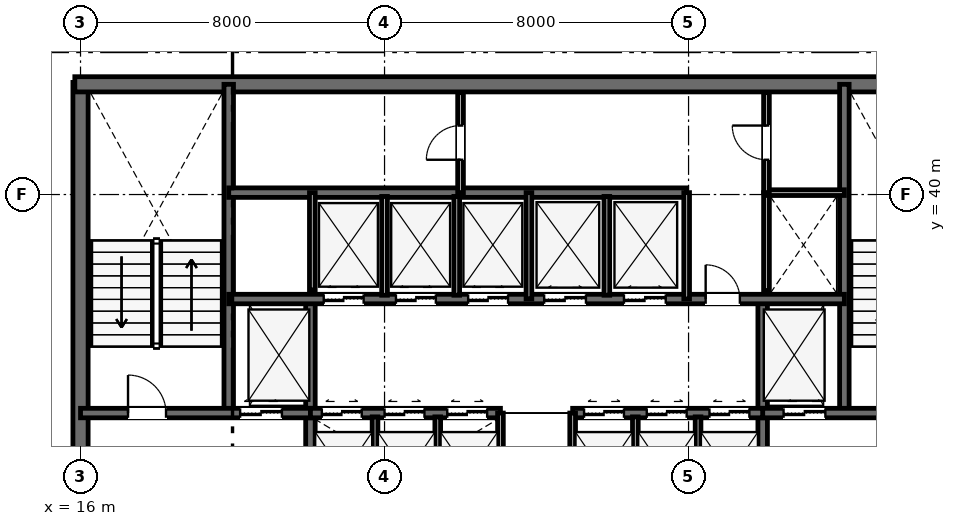
"""IFC4 building model, lengths in metres.
Left out: names, types, materials, properties, quantities, classifications, styles, units other than length and angle.
Written with IfcOpenShell. Run it as: python <this file> out.ifc"""

import sys

from ifc_helpers import new_model, si_unit, direction, frame, frame_2d, origin, place, context, subcontext, project, spatial, rectangle, extrude, element, fill, save


model = new_model("IFC4")
c1 = context("Model", 3, precision=1e-05, world=origin(), true_north=direction((0.0, 1.0)))
c2 = subcontext(c1, "Body", "Model", "MODEL_VIEW")
j1 = project(units=[si_unit("LENGTHUNIT", "METRE"), si_unit("PLANEANGLEUNIT", "RADIAN")], contexts=[c1])
p1 = place(None, origin())
s1 = spatial("IfcSite", under=j1, at=p1, CompositionType="ELEMENT")
p2 = place(p1, origin())
s2 = spatial("IfcBuilding", under=s1, at=p2, CompositionType="ELEMENT")
p3 = place(p2, origin())
s3 = spatial("IfcBuildingStorey", under=s2, at=p3, CompositionType="ELEMENT", Elevation=0.0)
p4 = place(p3, frame((16.0, 30.65, 0.0), z_axis=(0.0, 0.0, 1.0), x_axis=(0.0, 1.0, 0.0)))
e1 = element("IfcWall", 1, at=p4, inside=s3, PredefinedType="SHEAR", context=c2, shape_type="SweptSolid", body=[
    extrude(rectangle(XDim=12.3, YDim=0.4, at=frame_2d((6.15, 0.0))), origin(), (0.0, 0.0, 1.0), 6.0),
])
p5 = place(p3, frame((15.85, 42.9, 0.0), z_axis=(0.0, 0.0, 1.0), x_axis=(1.0, 0.0, 0.0)))
e2 = element("IfcWall", 2, at=p5, inside=s3, PredefinedType="SHEAR", context=c2, shape_type="SweptSolid", body=[
    extrude(rectangle(XDim=24.3, YDim=0.4, at=frame_2d((12.15, 0.0))), origin(), (0.0, 0.0, 1.0), 6.0),
])
for number, where, z_axis, x_axis in (
    (3, (19.9, 34.25, 0.0), (0.0, 0.0, 1.0), (0.0, 1.0, 0.0)),
    (4, (36.1, 34.25, 0.0), (0.0, 0.0, 1.0), (0.0, 1.0, 0.0)),
):
    element("IfcWall", number, at=place(p3, frame(where, z_axis=z_axis, x_axis=x_axis)), inside=s3, PredefinedType="SHEAR", context=c2, shape_type="SweptSolid", body=[
        extrude(rectangle(XDim=8.65, YDim=0.25, at=frame_2d((4.325, 0.0))), origin(), (0.0, 0.0, 1.0), 6.0),
    ])
for number, where, z_axis, x_axis in (
    (5, (22.05, 30.8, 0.0), (0.0, 0.0, 1.0), (0.0, 1.0, 0.0)),
    (6, (33.95, 30.8, 0.0), (0.0, 0.0, 1.0), (0.0, 1.0, 0.0)),
):
    element("IfcWall", number, at=place(p3, frame(where, z_axis=z_axis, x_axis=x_axis)), inside=s3, PredefinedType="SHEAR", context=c2, shape_type="SweptSolid", body=[
        extrude(rectangle(XDim=6.45, YDim=0.25, at=frame_2d((3.225, 0.0))), origin(), (0.0, 0.0, 1.0), 6.0),
    ])
p6 = place(p3, frame((16.0, 34.25, 0.0), z_axis=(0.0, 0.0, 1.0), x_axis=(1.0, 0.0, 0.0)))
e7 = element("IfcWall", 7, at=p6, inside=s3, PredefinedType="SHEAR", context=c2, shape_type="SweptSolid", body=[
    extrude(rectangle(XDim=6.05, YDim=0.25, at=frame_2d((3.025, 0.0))), origin(), (0.0, 0.0, 1.0), 6.0),
])
p7 = place(p6, frame((1.25, 0.0, 0.0)))
e8 = element("IfcOpeningElement", 8, at=p7, cuts=e7, PredefinedType="OPENING", context=c2, shape_type="SweptSolid", body=[
    extrude(rectangle(XDim=1.0, YDim=2.15, at=frame_2d((0.5, 1.075))), frame((0.0, 0.135, 0.0), z_axis=(0.0, -1.0, 0.0), x_axis=(1.0, 0.0, 0.0)), (0.0, 0.0, 1.0), 0.27),
])
p8 = place(p6, frame((4.2, 0.0, 0.0)))
e9 = element("IfcOpeningElement", 9, at=p8, cuts=e7, PredefinedType="OPENING", context=c2, shape_type="SweptSolid", body=[
    extrude(rectangle(XDim=1.1, YDim=2.15, at=frame_2d((0.55, 1.075))), frame((0.0, 0.135, 0.0), z_axis=(0.0, -1.0, 0.0), x_axis=(1.0, 0.0, 0.0)), (0.0, 0.0, 1.0), 0.27),
])
p9 = place(p3, frame((33.95, 34.25, 0.0), z_axis=(0.0, 0.0, 1.0), x_axis=(1.0, 0.0, 0.0)))
e10 = element("IfcWall", 10, at=p9, inside=s3, PredefinedType="SHEAR", context=c2, shape_type="SweptSolid", body=[
    extrude(rectangle(XDim=6.05, YDim=0.25, at=frame_2d((3.025, 0.0))), origin(), (0.0, 0.0, 1.0), 6.0),
])
p10 = place(p9, frame((3.7, 0.0, 0.0)))
e11 = element("IfcOpeningElement", 11, at=p10, cuts=e10, PredefinedType="OPENING", context=c2, shape_type="SweptSolid", body=[
    extrude(rectangle(XDim=1.0, YDim=2.15, at=frame_2d((0.5, 1.075))), frame((0.0, 0.135, 0.0), z_axis=(0.0, -1.0, 0.0), x_axis=(1.0, 0.0, 0.0)), (0.0, 0.0, 1.0), 0.27),
])
p11 = place(p9, frame((0.55, 0.0, 0.0)))
e12 = element("IfcOpeningElement", 12, at=p11, cuts=e10, PredefinedType="OPENING", context=c2, shape_type="SweptSolid", body=[
    extrude(rectangle(XDim=1.1, YDim=2.15, at=frame_2d((0.55, 1.075))), frame((0.0, 0.135, 0.0), z_axis=(0.0, -1.0, 0.0), x_axis=(1.0, 0.0, 0.0)), (0.0, 0.0, 1.0), 0.27),
])
p12 = place(p3, frame((22.05, 34.25, 0.0), z_axis=(0.0, 0.0, 1.0), x_axis=(1.0, 0.0, 0.0)))
e13 = element("IfcWall", 13, at=p12, inside=s3, PredefinedType="SHEAR", context=c2, shape_type="SweptSolid", body=[
    extrude(rectangle(XDim=5.0, YDim=0.25, at=frame_2d((2.5, 0.0))), origin(), (0.0, 0.0, 1.0), 6.0),
])
p13 = place(p12, frame((0.3, 0.0, 0.0)))
e14 = element("IfcOpeningElement", 14, at=p13, cuts=e13, PredefinedType="OPENING", context=c2, shape_type="SweptSolid", body=[
    extrude(rectangle(XDim=1.05, YDim=2.15, at=frame_2d((0.525, 1.075))), frame((0.0, 0.135, 0.0), z_axis=(0.0, -1.0, 0.0), x_axis=(1.0, 0.0, 0.0)), (0.0, 0.0, 1.0), 0.27),
])
p14 = place(p12, frame((1.95, 0.0, 0.0)))
e15 = element("IfcOpeningElement", 15, at=p14, cuts=e13, PredefinedType="OPENING", context=c2, shape_type="SweptSolid", body=[
    extrude(rectangle(XDim=1.05, YDim=2.15, at=frame_2d((0.525, 1.075))), frame((0.0, 0.135, 0.0), z_axis=(0.0, -1.0, 0.0), x_axis=(1.0, 0.0, 0.0)), (0.0, 0.0, 1.0), 0.27),
])
p15 = place(p12, frame((3.6, 0.0, 0.0)))
e16 = element("IfcOpeningElement", 16, at=p15, cuts=e13, PredefinedType="OPENING", context=c2, shape_type="SweptSolid", body=[
    extrude(rectangle(XDim=1.05, YDim=2.15, at=frame_2d((0.525, 1.075))), frame((0.0, 0.135, 0.0), z_axis=(0.0, -1.0, 0.0), x_axis=(1.0, 0.0, 0.0)), (0.0, 0.0, 1.0), 0.27),
])
p16 = place(p3, frame((28.95, 34.25, 0.0), z_axis=(0.0, 0.0, 1.0), x_axis=(1.0, 0.0, 0.0)))
e17 = element("IfcWall", 17, at=p16, inside=s3, PredefinedType="SHEAR", context=c2, shape_type="SweptSolid", body=[
    extrude(rectangle(XDim=5.0, YDim=0.25, at=frame_2d((2.5, 0.0))), origin(), (0.0, 0.0, 1.0), 6.0),
])
p17 = place(p16, frame((0.3, 0.0, 0.0)))
e18 = element("IfcOpeningElement", 18, at=p17, cuts=e17, PredefinedType="OPENING", context=c2, shape_type="SweptSolid", body=[
    extrude(rectangle(XDim=1.05, YDim=2.15, at=frame_2d((0.525, 1.075))), frame((0.0, 0.135, 0.0), z_axis=(0.0, -1.0, 0.0), x_axis=(1.0, 0.0, 0.0)), (0.0, 0.0, 1.0), 0.27),
])
p18 = place(p16, frame((1.95, 0.0, 0.0)))
e19 = element("IfcOpeningElement", 19, at=p18, cuts=e17, PredefinedType="OPENING", context=c2, shape_type="SweptSolid", body=[
    extrude(rectangle(XDim=1.05, YDim=2.15, at=frame_2d((0.525, 1.075))), frame((0.0, 0.135, 0.0), z_axis=(0.0, -1.0, 0.0), x_axis=(1.0, 0.0, 0.0)), (0.0, 0.0, 1.0), 0.27),
])
p19 = place(p16, frame((3.6, 0.0, 0.0)))
e20 = element("IfcOpeningElement", 20, at=p19, cuts=e17, PredefinedType="OPENING", context=c2, shape_type="SweptSolid", body=[
    extrude(rectangle(XDim=1.05, YDim=2.15, at=frame_2d((0.525, 1.075))), frame((0.0, 0.135, 0.0), z_axis=(0.0, -1.0, 0.0), x_axis=(1.0, 0.0, 0.0)), (0.0, 0.0, 1.0), 0.27),
])
p20 = place(p3, frame((19.9, 37.25, 0.0), z_axis=(0.0, 0.0, 1.0), x_axis=(1.0, 0.0, 0.0)))
e21 = element("IfcWall", 21, at=p20, inside=s3, PredefinedType="SHEAR", context=c2, shape_type="SweptSolid", body=[
    extrude(rectangle(XDim=16.2, YDim=0.25, at=frame_2d((8.1, 0.0))), origin(), (0.0, 0.0, 1.0), 6.0),
])
p21 = place(p20, frame((12.55, 0.0, 0.0)))
e22 = element("IfcOpeningElement", 22, at=p21, cuts=e21, PredefinedType="OPENING", context=c2, shape_type="SweptSolid", body=[
    extrude(rectangle(XDim=0.9, YDim=2.15, at=frame_2d((0.45, 1.075))), frame((0.0, 0.135, 0.0), z_axis=(0.0, -1.0, 0.0), x_axis=(1.0, 0.0, 0.0)), (0.0, 0.0, 1.0), 0.27),
])
p22 = place(p20, frame((2.5, 0.0, 0.0)))
e23 = element("IfcOpeningElement", 23, at=p22, cuts=e21, PredefinedType="OPENING", context=c2, shape_type="SweptSolid", body=[
    extrude(rectangle(XDim=1.05, YDim=2.15, at=frame_2d((0.525, 1.075))), frame((0.0, 0.135, 0.0), z_axis=(0.0, -1.0, 0.0), x_axis=(1.0, 0.0, 0.0)), (0.0, 0.0, 1.0), 0.27),
])
p23 = place(p20, frame((4.4, 0.0, 0.0)))
e24 = element("IfcOpeningElement", 24, at=p23, cuts=e21, PredefinedType="OPENING", context=c2, shape_type="SweptSolid", body=[
    extrude(rectangle(XDim=1.05, YDim=2.15, at=frame_2d((0.525, 1.075))), frame((0.0, 0.135, 0.0), z_axis=(0.0, -1.0, 0.0), x_axis=(1.0, 0.0, 0.0)), (0.0, 0.0, 1.0), 0.27),
])
p24 = place(p20, frame((6.3, 0.0, 0.0)))
e25 = element("IfcOpeningElement", 25, at=p24, cuts=e21, PredefinedType="OPENING", context=c2, shape_type="SweptSolid", body=[
    extrude(rectangle(XDim=1.05, YDim=2.15, at=frame_2d((0.525, 1.075))), frame((0.0, 0.135, 0.0), z_axis=(0.0, -1.0, 0.0), x_axis=(1.0, 0.0, 0.0)), (0.0, 0.0, 1.0), 0.27),
])
p25 = place(p20, frame((8.3, 0.0, 0.0)))
e26 = element("IfcOpeningElement", 26, at=p25, cuts=e21, PredefinedType="OPENING", context=c2, shape_type="SweptSolid", body=[
    extrude(rectangle(XDim=1.1, YDim=2.15, at=frame_2d((0.55, 1.075))), frame((0.0, 0.135, 0.0), z_axis=(0.0, -1.0, 0.0), x_axis=(1.0, 0.0, 0.0)), (0.0, 0.0, 1.0), 0.27),
])
p26 = place(p20, frame((10.4, 0.0, 0.0)))
e27 = element("IfcOpeningElement", 27, at=p26, cuts=e21, PredefinedType="OPENING", context=c2, shape_type="SweptSolid", body=[
    extrude(rectangle(XDim=1.1, YDim=2.15, at=frame_2d((0.55, 1.075))), frame((0.0, 0.135, 0.0), z_axis=(0.0, -1.0, 0.0), x_axis=(1.0, 0.0, 0.0)), (0.0, 0.0, 1.0), 0.27),
])
p27 = place(p3, frame((19.9, 40.05, 0.0), z_axis=(0.0, 0.0, 1.0), x_axis=(1.0, 0.0, 0.0)))
e28 = element("IfcWall", 28, at=p27, inside=s3, PredefinedType="SHEAR", context=c2, shape_type="SweptSolid", body=[
    extrude(rectangle(XDim=12.05, YDim=0.25, at=frame_2d((6.025, 0.0))), origin(), (0.0, 0.0, 1.0), 6.0),
])
for number, where, z_axis, x_axis in (
    (29, (27.05, 30.8, 0.0), (0.0, 0.0, 1.0), (0.0, 1.0, 0.0)),
    (30, (28.95, 30.8, 0.0), (0.0, 0.0, 1.0), (0.0, 1.0, 0.0)),
):
    element("IfcWall", number, at=place(p3, frame(where, z_axis=z_axis, x_axis=x_axis)), inside=s3, PredefinedType="PLUMBINGWALL", context=c2, shape_type="SweptSolid", body=[
        extrude(rectangle(XDim=3.45, YDim=0.15, at=frame_2d((1.725, 0.0))), origin(), (0.0, 0.0, 1.0), 5.41),
    ])
for number, where, z_axis, x_axis in (
    (31, (23.75, 31.05, 0.0), (0.0, 0.0, 1.0), (0.0, 1.0, 0.0)),
    (32, (25.4, 31.05, 0.0), (0.0, 0.0, 1.0), (0.0, 1.0, 0.0)),
    (33, (30.6, 31.05, 0.0), (0.0, 0.0, 1.0), (0.0, 1.0, 0.0)),
    (34, (32.25, 31.05, 0.0), (0.0, 0.0, 1.0), (0.0, 1.0, 0.0)),
):
    element("IfcWall", number, at=place(p3, frame(where, z_axis=z_axis, x_axis=x_axis)), inside=s3, PredefinedType="PLUMBINGWALL", context=c2, shape_type="SweptSolid", body=[
        extrude(rectangle(XDim=3.1, YDim=0.15, at=frame_2d((1.55, 0.0))), origin(), (0.0, 0.0, 1.0), 5.67),
    ])
p28 = place(p3, frame((22.1, 37.49, 0.0), z_axis=(0.0, 0.0, 1.0), x_axis=(0.0, 1.0, 0.0)))
e35 = element("IfcWall", 35, at=p28, inside=s3, PredefinedType="PLUMBINGWALL", context=c2, shape_type="SweptSolid", body=[
    extrude(rectangle(XDim=2.56, YDim=0.15, at=frame_2d((1.28, 0.0))), origin(), (0.0, 0.0, 1.0), 5.67),
])
p29 = place(p3, frame((27.8, 37.25, 0.0), z_axis=(0.0, 0.0, 1.0), x_axis=(0.0, 1.0, 0.0)))
e36 = element("IfcWall", 36, at=p29, inside=s3, PredefinedType="PLUMBINGWALL", context=c2, shape_type="SweptSolid", body=[
    extrude(rectangle(XDim=2.8, YDim=0.15, at=frame_2d((1.4, 0.0))), origin(), (0.0, 0.0, 1.0), 5.67),
])
for number, where, z_axis, x_axis in (
    (37, (24.0, 37.35, 0.0), (0.0, 0.0, 1.0), (0.0, 1.0, 0.0)),
    (38, (25.9, 37.35, 0.0), (0.0, 0.0, 1.0), (0.0, 1.0, 0.0)),
):
    element("IfcWall", number, at=place(p3, frame(where, z_axis=z_axis, x_axis=x_axis)), inside=s3, PredefinedType="PLUMBINGWALL", context=c2, shape_type="SweptSolid", body=[
        extrude(rectangle(XDim=2.6, YDim=0.15, at=frame_2d((1.3, 0.0))), origin(), (0.0, 0.0, 1.0), 5.67),
    ])
p30 = place(p3, frame((31.95, 37.25, 0.0), z_axis=(0.0, 0.0, 1.0), x_axis=(0.0, 1.0, 0.0)))
e39 = element("IfcWall", 39, at=p30, inside=s3, PredefinedType="PLUMBINGWALL", context=c2, shape_type="SweptSolid", body=[
    extrude(rectangle(XDim=2.8, YDim=0.15, at=frame_2d((1.4, 0.0))), origin(), (0.0, 0.0, 1.0), 5.67),
])
p31 = place(p3, frame((29.85, 37.35, 0.0), z_axis=(0.0, 0.0, 1.0), x_axis=(0.0, 1.0, 0.0)))
e40 = element("IfcWall", 40, at=p31, inside=s3, PredefinedType="PLUMBINGWALL", context=c2, shape_type="SweptSolid", body=[
    extrude(rectangle(XDim=2.6, YDim=0.15, at=frame_2d((1.3, 0.0))), origin(), (0.0, 0.0, 1.0), 5.67),
])
p32 = place(p3, frame((34.05, 37.473, 0.0), z_axis=(0.0, 0.0, 1.0), x_axis=(0.0, 1.0, 0.0)))
e41 = element("IfcWall", 41, at=p32, inside=s3, PredefinedType="PLUMBINGWALL", context=c2, shape_type="SweptSolid", body=[
    extrude(rectangle(XDim=2.577, YDim=0.15, at=frame_2d((1.288, 0.0))), origin(), (0.0, 0.0, 1.0), 5.67),
])
p33 = place(p3, frame((34.05, 40.05, 0.0), z_axis=(0.0, 0.0, 1.0), x_axis=(1.0, 0.0, 0.0)))
e42 = element("IfcWall", 42, at=p33, inside=s3, PredefinedType="PARTITIONING", context=c2, shape_type="SweptSolid", body=[
    extrude(rectangle(XDim=2.05, YDim=0.15, at=frame_2d((1.025, 0.0))), origin(), (0.0, 0.0, 1.0), 5.67),
])
p34 = place(p3, frame((34.05, 40.05, 0.0), z_axis=(0.0, 0.0, 1.0), x_axis=(0.0, 1.0, 0.0)))
e43 = element("IfcWall", 43, at=p34, inside=s3, PredefinedType="PARTITIONING", context=c2, shape_type="SweptSolid", body=[
    extrude(rectangle(XDim=2.63, YDim=0.15, at=frame_2d((1.315, 0.0))), origin(), (0.0, 0.0, 1.0), 5.67),
])
p35 = place(p34, frame((0.865, 0.0, 0.0)))
e44 = element("IfcOpeningElement", 44, at=p35, cuts=e43, PredefinedType="OPENING", context=c2, shape_type="SweptSolid", body=[
    extrude(rectangle(XDim=0.9, YDim=2.15, at=frame_2d((0.45, 1.075))), frame((0.0, 0.085, 0.0), z_axis=(0.0, -1.0, 0.0), x_axis=(1.0, 0.0, 0.0)), (0.0, 0.0, 1.0), 0.17),
])
p36 = place(p3, frame((26.0, 40.05, 0.0), z_axis=(0.0, 0.0, 1.0), x_axis=(0.0, 1.0, 0.0)))
e45 = element("IfcWall", 45, at=p36, inside=s3, PredefinedType="PARTITIONING", context=c2, shape_type="SweptSolid", body=[
    extrude(rectangle(XDim=2.63, YDim=0.15, at=frame_2d((1.315, 0.0))), origin(), (0.0, 0.0, 1.0), 5.67),
])
p37 = place(p36, frame((0.865, 0.0, 0.0)))
e46 = element("IfcOpeningElement", 46, at=p37, cuts=e45, PredefinedType="OPENING", context=c2, shape_type="SweptSolid", body=[
    extrude(rectangle(XDim=0.9, YDim=2.15, at=frame_2d((0.45, 1.075))), frame((0.0, 0.085, 0.0), z_axis=(0.0, -1.0, 0.0), x_axis=(1.0, 0.0, 0.0)), (0.0, 0.0, 1.0), 0.17),
])
p38 = place(p7, origin())
e47 = element("IfcDoor", 47, at=p38, inside=s3, OperationType="SINGLE_SWING_LEFT", PredefinedType="DOOR", context=c2, shape_type="SweptSolid", body=[
    extrude(rectangle(XDim=1.0, YDim=2.15, at=frame_2d((0.5, 1.075))), frame((0.0, 0.025, 0.0), z_axis=(0.0, -1.0, 0.0), x_axis=(1.0, 0.0, 0.0)), (0.0, 0.0, 1.0), 0.05),
])
fill(e8, e47)
p39 = place(p21, origin())
e48 = element("IfcDoor", 48, at=p39, inside=s3, OperationType="SINGLE_SWING_LEFT", PredefinedType="DOOR", context=c2, shape_type="SweptSolid", body=[
    extrude(rectangle(XDim=0.9, YDim=2.15, at=frame_2d((0.45, 1.075))), frame((0.0, 0.025, 0.0), z_axis=(0.0, -1.0, 0.0), x_axis=(1.0, 0.0, 0.0)), (0.0, 0.0, 1.0), 0.05),
])
fill(e22, e48)
p40 = place(p35, origin())
e49 = element("IfcDoor", 49, at=p40, inside=s3, OperationType="SINGLE_SWING_RIGHT", PredefinedType="DOOR", context=c2, shape_type="SweptSolid", body=[
    extrude(rectangle(XDim=0.9, YDim=2.15, at=frame_2d((0.45, 1.075))), frame((0.0, 0.025, 0.0), z_axis=(0.0, -1.0, 0.0), x_axis=(1.0, 0.0, 0.0)), (0.0, 0.0, 1.0), 0.05),
])
fill(e44, e49)
p41 = place(p37, origin())
e50 = element("IfcDoor", 50, at=p41, inside=s3, OperationType="SINGLE_SWING_LEFT", PredefinedType="DOOR", context=c2, shape_type="SweptSolid", body=[
    extrude(rectangle(XDim=0.9, YDim=2.15, at=frame_2d((0.45, 1.075))), frame((0.0, 0.025, 0.0), z_axis=(0.0, -1.0, 0.0), x_axis=(1.0, 0.0, 0.0)), (0.0, 0.0, 1.0), 0.05),
])
fill(e46, e50)
p42 = place(p8, origin())
e51 = element("IfcDoor", 51, at=p42, inside=s3, OperationType="DOUBLE_DOOR_SLIDING", PredefinedType="DOOR", context=c2, shape_type="SweptSolid", body=[
    extrude(rectangle(XDim=1.1, YDim=2.15, at=frame_2d((0.55, 1.075))), frame((0.0, 0.025, 0.0), z_axis=(0.0, -1.0, 0.0), x_axis=(1.0, 0.0, 0.0)), (0.0, 0.0, 1.0), 0.05),
])
fill(e9, e51)
p43 = place(p11, origin())
e52 = element("IfcDoor", 52, at=p43, inside=s3, OperationType="DOUBLE_DOOR_SLIDING", PredefinedType="DOOR", context=c2, shape_type="SweptSolid", body=[
    extrude(rectangle(XDim=1.1, YDim=2.15, at=frame_2d((0.55, 1.075))), frame((0.0, 0.025, 0.0), z_axis=(0.0, -1.0, 0.0), x_axis=(1.0, 0.0, 0.0)), (0.0, 0.0, 1.0), 0.05),
])
fill(e12, e52)
p44 = place(p13, origin())
e53 = element("IfcDoor", 53, at=p44, inside=s3, OperationType="DOUBLE_DOOR_SLIDING", PredefinedType="DOOR", context=c2, shape_type="SweptSolid", body=[
    extrude(rectangle(XDim=1.05, YDim=2.15, at=frame_2d((0.525, 1.075))), frame((0.0, 0.025, 0.0), z_axis=(0.0, -1.0, 0.0), x_axis=(1.0, 0.0, 0.0)), (0.0, 0.0, 1.0), 0.05),
])
fill(e14, e53)
p45 = place(p14, origin())
e54 = element("IfcDoor", 54, at=p45, inside=s3, OperationType="DOUBLE_DOOR_SLIDING", PredefinedType="DOOR", context=c2, shape_type="SweptSolid", body=[
    extrude(rectangle(XDim=1.05, YDim=2.15, at=frame_2d((0.525, 1.075))), frame((0.0, 0.025, 0.0), z_axis=(0.0, -1.0, 0.0), x_axis=(1.0, 0.0, 0.0)), (0.0, 0.0, 1.0), 0.05),
])
fill(e15, e54)
p46 = place(p15, origin())
e55 = element("IfcDoor", 55, at=p46, inside=s3, OperationType="DOUBLE_DOOR_SLIDING", PredefinedType="DOOR", context=c2, shape_type="SweptSolid", body=[
    extrude(rectangle(XDim=1.05, YDim=2.15, at=frame_2d((0.525, 1.075))), frame((0.0, 0.025, 0.0), z_axis=(0.0, -1.0, 0.0), x_axis=(1.0, 0.0, 0.0)), (0.0, 0.0, 1.0), 0.05),
])
fill(e16, e55)
p47 = place(p17, origin())
e56 = element("IfcDoor", 56, at=p47, inside=s3, OperationType="DOUBLE_DOOR_SLIDING", PredefinedType="DOOR", context=c2, shape_type="SweptSolid", body=[
    extrude(rectangle(XDim=1.05, YDim=2.15, at=frame_2d((0.525, 1.075))), frame((0.0, 0.025, 0.0), z_axis=(0.0, -1.0, 0.0), x_axis=(1.0, 0.0, 0.0)), (0.0, 0.0, 1.0), 0.05),
])
fill(e18, e56)
p48 = place(p18, origin())
e57 = element("IfcDoor", 57, at=p48, inside=s3, OperationType="DOUBLE_DOOR_SLIDING", PredefinedType="DOOR", context=c2, shape_type="SweptSolid", body=[
    extrude(rectangle(XDim=1.05, YDim=2.15, at=frame_2d((0.525, 1.075))), frame((0.0, 0.025, 0.0), z_axis=(0.0, -1.0, 0.0), x_axis=(1.0, 0.0, 0.0)), (0.0, 0.0, 1.0), 0.05),
])
fill(e19, e57)
p49 = place(p19, origin())
e58 = element("IfcDoor", 58, at=p49, inside=s3, OperationType="DOUBLE_DOOR_SLIDING", PredefinedType="DOOR", context=c2, shape_type="SweptSolid", body=[
    extrude(rectangle(XDim=1.05, YDim=2.15, at=frame_2d((0.525, 1.075))), frame((0.0, 0.025, 0.0), z_axis=(0.0, -1.0, 0.0), x_axis=(1.0, 0.0, 0.0)), (0.0, 0.0, 1.0), 0.05),
])
fill(e20, e58)
p50 = place(p22, origin())
e59 = element("IfcDoor", 59, at=p50, inside=s3, OperationType="DOUBLE_DOOR_SLIDING", PredefinedType="DOOR", context=c2, shape_type="SweptSolid", body=[
    extrude(rectangle(XDim=1.05, YDim=2.15, at=frame_2d((0.525, 1.075))), frame((0.0, 0.025, 0.0), z_axis=(0.0, -1.0, 0.0), x_axis=(1.0, 0.0, 0.0)), (0.0, 0.0, 1.0), 0.05),
])
fill(e23, e59)
p51 = place(p23, origin())
e60 = element("IfcDoor", 60, at=p51, inside=s3, OperationType="DOUBLE_DOOR_SLIDING", PredefinedType="DOOR", context=c2, shape_type="SweptSolid", body=[
    extrude(rectangle(XDim=1.05, YDim=2.15, at=frame_2d((0.525, 1.075))), frame((0.0, 0.025, 0.0), z_axis=(0.0, -1.0, 0.0), x_axis=(1.0, 0.0, 0.0)), (0.0, 0.0, 1.0), 0.05),
])
fill(e24, e60)
p52 = place(p24, origin())
e61 = element("IfcDoor", 61, at=p52, inside=s3, OperationType="DOUBLE_DOOR_SLIDING", PredefinedType="DOOR", context=c2, shape_type="SweptSolid", body=[
    extrude(rectangle(XDim=1.05, YDim=2.15, at=frame_2d((0.525, 1.075))), frame((0.0, 0.025, 0.0), z_axis=(0.0, -1.0, 0.0), x_axis=(1.0, 0.0, 0.0)), (0.0, 0.0, 1.0), 0.05),
])
fill(e25, e61)
p53 = place(p25, origin())
e62 = element("IfcDoor", 62, at=p53, inside=s3, OperationType="DOUBLE_DOOR_SLIDING", PredefinedType="DOOR", context=c2, shape_type="SweptSolid", body=[
    extrude(rectangle(XDim=1.1, YDim=2.15, at=frame_2d((0.55, 1.075))), frame((0.0, 0.025, 0.0), z_axis=(0.0, -1.0, 0.0), x_axis=(1.0, 0.0, 0.0)), (0.0, 0.0, 1.0), 0.05),
])
fill(e26, e62)
p54 = place(p26, origin())
e63 = element("IfcDoor", 63, at=p54, inside=s3, OperationType="DOUBLE_DOOR_SLIDING", PredefinedType="DOOR", context=c2, shape_type="SweptSolid", body=[
    extrude(rectangle(XDim=1.1, YDim=2.15, at=frame_2d((0.55, 1.075))), frame((0.0, 0.025, 0.0), z_axis=(0.0, -1.0, 0.0), x_axis=(1.0, 0.0, 0.0)), (0.0, 0.0, 1.0), 0.05),
])
fill(e27, e63)
save(model, sys.argv[1])
